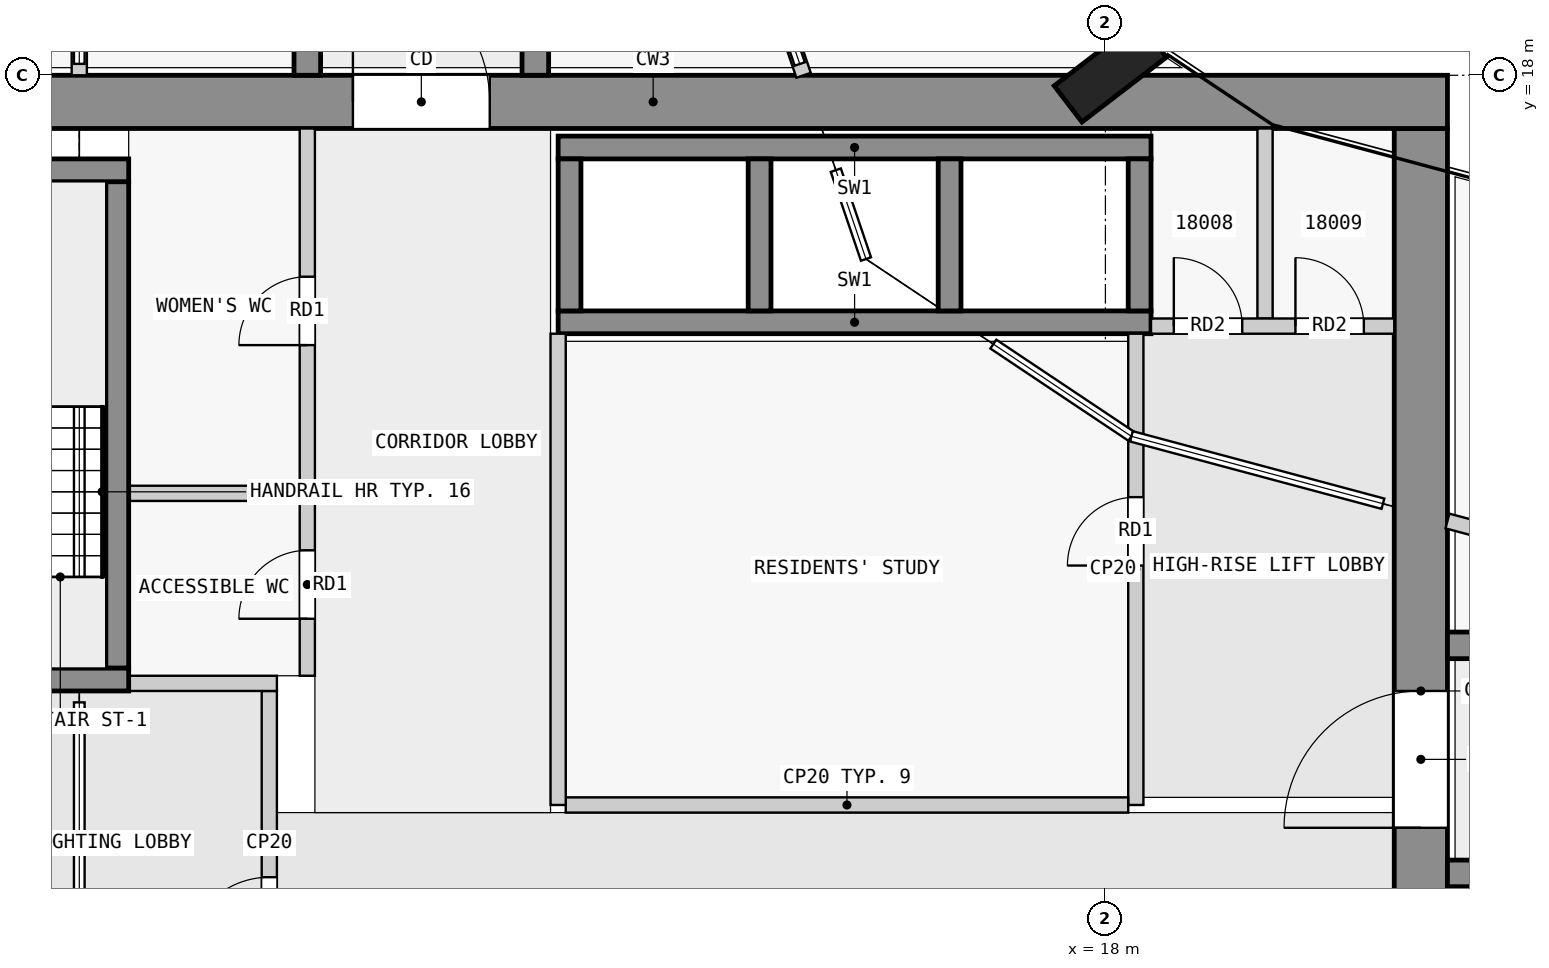
"""IFC4 building model, lengths in metres.
Left out: names, types, materials, properties, quantities, classifications, styles, units other than length and angle.
Written with IfcOpenShell. Run it as: python <this file> out.ifc"""

import sys

from ifc_helpers import new_model, si_unit, direction, frame, frame_2d, origin, origin_2d, place, context, subcontext, project, spatial, rectangle, extrude, element, fill, save


model = new_model("IFC4")
c1 = context("Model", 3, precision=1e-05, world=origin(), true_north=direction((0.0, 1.0)))
c2 = subcontext(c1, "Body", "Model", "MODEL_VIEW")
j1 = project(units=[si_unit("LENGTHUNIT", "METRE"), si_unit("PLANEANGLEUNIT", "RADIAN")], contexts=[c1])
p1 = place(None, origin())
s1 = spatial("IfcSite", under=j1, at=p1, CompositionType="ELEMENT")
p2 = place(p1, origin())
s2 = spatial("IfcBuilding", under=s1, at=p2, CompositionType="ELEMENT")
p3 = place(p2, frame((0.0, 0.0, 72.3)))
s3 = spatial("IfcBuildingStorey", under=s2, at=p3, CompositionType="ELEMENT", Elevation=72.3)
p4 = place(p3, frame((18.065, 18.05, 0.0), z_axis=(0.0, 0.0, 1.0), x_axis=(-0.608810846443, 0.793315418515, 0.0)))
e1 = element("IfcColumn", 1, at=p4, inside=s3, PredefinedType="COLUMN", context=c2, shape_type="SweptSolid", body=[
    extrude(rectangle(XDim=0.6, YDim=1.4, at=origin_2d()), origin(), (0.0, 0.0, 1.0), 6.0),
])
p5 = place(p3, frame((1.6, 17.65, 0.0), z_axis=(0.0, 0.0, 1.0), x_axis=(1.0, 0.0, 0.0)))
e2 = element("IfcWall", 2, at=p5, inside=s3, PredefinedType="SHEAR", context=c2, shape_type="SweptSolid", body=[
    extrude(rectangle(XDim=20.9, YDim=0.7, at=frame_2d((10.45, 0.0))), origin(), (0.0, 0.0, 1.0), 5.75),
])
p6 = place(p5, frame((6.5, 0.0, 0.0)))
e3 = element("IfcOpeningElement", 3, at=p6, cuts=e2, PredefinedType="OPENING", context=c2, shape_type="SweptSolid", body=[
    extrude(rectangle(XDim=1.8, YDim=2.1, at=frame_2d((0.9, 1.05))), frame((0.0, 0.36, 0.0), z_axis=(0.0, -1.0, 0.0), x_axis=(1.0, 0.0, 0.0)), (0.0, 0.0, 1.0), 0.72),
])
p7 = place(p3, frame((22.15, 2.5, 0.0), z_axis=(0.0, 0.0, 1.0), x_axis=(0.0, 1.0, 0.0)))
e4 = element("IfcWall", 4, at=p7, inside=s3, PredefinedType="SHEAR", context=c2, shape_type="SweptSolid", body=[
    extrude(rectangle(XDim=14.8, YDim=0.7, at=frame_2d((7.4, 0.0))), origin(), (0.0, 0.0, 1.0), 5.75),
])
p8 = place(p7, frame((5.6, 0.0, 0.0)))
e5 = element("IfcOpeningElement", 5, at=p8, cuts=e4, PredefinedType="OPENING", context=c2, shape_type="SweptSolid", body=[
    extrude(rectangle(XDim=1.8, YDim=2.1, at=frame_2d((0.9, 1.05))), frame((0.0, 0.36, 0.0), z_axis=(0.0, -1.0, 0.0), x_axis=(1.0, 0.0, 0.0)), (0.0, 0.0, 1.0), 0.72),
])
p9 = place(p3, frame((2.3, 10.05, 0.0), z_axis=(0.0, 0.0, 1.0), x_axis=(1.0, 0.0, 0.0)))
e6 = element("IfcWall", 6, at=p9, inside=s3, PredefinedType="SHEAR", context=c2, shape_type="SweptSolid", body=[
    extrude(rectangle(XDim=2.85, YDim=0.3, at=frame_2d((1.425, 0.0))), origin(), (0.0, 0.0, 1.0), 5.75),
])
p10 = place(p9, frame((0.25, 0.0, 0.0)))
e7 = element("IfcOpeningElement", 7, at=p10, cuts=e6, PredefinedType="OPENING", context=c2, shape_type="SweptSolid", body=[
    extrude(rectangle(XDim=1.1, YDim=2.1, at=frame_2d((0.55, 1.05))), frame((0.0, 0.16, 0.0), z_axis=(0.0, -1.0, 0.0), x_axis=(1.0, 0.0, 0.0)), (0.0, 0.0, 1.0), 0.32),
])
p11 = place(p3, frame((5.0, 10.2, 0.0), z_axis=(0.0, 0.0, 1.0), x_axis=(0.0, 1.0, 0.0)))
e8 = element("IfcWall", 8, at=p11, inside=s3, PredefinedType="SHEAR", context=c2, shape_type="SweptSolid", body=[
    extrude(rectangle(XDim=6.4, YDim=0.3, at=frame_2d((3.2, 0.0))), origin(), (0.0, 0.0, 1.0), 5.75),
])
p12 = place(p3, frame((2.3, 16.75, 0.0), z_axis=(0.0, 0.0, 1.0), x_axis=(1.0, 0.0, 0.0)))
e9 = element("IfcWall", 9, at=p12, inside=s3, PredefinedType="SHEAR", context=c2, shape_type="SweptSolid", body=[
    extrude(rectangle(XDim=2.85, YDim=0.3, at=frame_2d((1.425, 0.0))), origin(), (0.0, 0.0, 1.0), 5.75),
])
for number, where, z_axis, x_axis in (
    (10, (10.8, 17.05, 0.0), (0.0, 0.0, 1.0), (1.0, 0.0, 0.0)),
    (11, (10.8, 14.75, 0.0), (0.0, 0.0, 1.0), (1.0, 0.0, 0.0)),
):
    element("IfcWall", number, at=place(p3, frame(where, z_axis=z_axis, x_axis=x_axis)), inside=s3, PredefinedType="SHEAR", context=c2, shape_type="SweptSolid", body=[
        extrude(rectangle(XDim=7.8, YDim=0.3, at=frame_2d((3.9, 0.0))), origin(), (0.0, 0.0, 1.0), 5.75),
    ])
for number, where, z_axis, x_axis in (
    (12, (10.95, 14.9, 0.0), (0.0, 0.0, 1.0), (0.0, 1.0, 0.0)),
    (13, (13.45, 14.9, 0.0), (0.0, 0.0, 1.0), (0.0, 1.0, 0.0)),
    (14, (15.95, 14.9, 0.0), (0.0, 0.0, 1.0), (0.0, 1.0, 0.0)),
    (15, (18.45, 14.9, 0.0), (0.0, 0.0, 1.0), (0.0, 1.0, 0.0)),
):
    element("IfcWall", number, at=place(p3, frame(where, z_axis=z_axis, x_axis=x_axis)), inside=s3, PredefinedType="SHEAR", context=c2, shape_type="SweptSolid", body=[
        extrude(rectangle(XDim=2.0, YDim=0.3, at=frame_2d((1.0, 0.0))), origin(), (0.0, 0.0, 1.0), 5.75),
    ])
p13 = place(p3, frame((22.5, 7.5, 0.0), z_axis=(0.0, 0.0, 1.0), x_axis=(1.0, 0.0, 0.0)))
e16 = element("IfcWall", 16, at=p13, inside=s3, PredefinedType="SHEAR", context=c2, shape_type="SweptSolid", body=[
    extrude(rectangle(XDim=22.5, YDim=0.35, at=frame_2d((11.25, 0.0))), origin(), (0.0, 0.0, 1.0), 5.75),
])
p14 = place(p13, frame((20.1, 0.0, 0.0)))
e17 = element("IfcOpeningElement", 17, at=p14, cuts=e16, PredefinedType="OPENING", context=c2, shape_type="SweptSolid", body=[
    extrude(rectangle(XDim=1.8, YDim=2.1, at=frame_2d((0.9, 1.05))), frame((0.0, 0.185, 0.0), z_axis=(0.0, -1.0, 0.0), x_axis=(1.0, 0.0, 0.0)), (0.0, 0.0, 1.0), 0.37),
])
p15 = place(p13, frame((15.35, 0.0, 0.0)))
e18 = element("IfcOpeningElement", 18, at=p15, cuts=e16, PredefinedType="OPENING", context=c2, shape_type="SweptSolid", body=[
    extrude(rectangle(XDim=0.9, YDim=2.1, at=frame_2d((0.45, 1.05))), frame((0.0, 0.185, 0.0), z_axis=(0.0, -1.0, 0.0), x_axis=(1.0, 0.0, 0.0)), (0.0, 0.0, 1.0), 0.37),
])
p16 = place(p3, frame((22.5, 10.5, 0.0), z_axis=(0.0, 0.0, 1.0), x_axis=(1.0, 0.0, 0.0)))
e19 = element("IfcWall", 19, at=p16, inside=s3, PredefinedType="SHEAR", context=c2, shape_type="SweptSolid", body=[
    extrude(rectangle(XDim=22.5, YDim=0.35, at=frame_2d((11.25, 0.0))), origin(), (0.0, 0.0, 1.0), 5.75),
])
p17 = place(p16, frame((10.85, 0.0, 0.0)))
e20 = element("IfcOpeningElement", 20, at=p17, cuts=e19, PredefinedType="OPENING", context=c2, shape_type="SweptSolid", body=[
    extrude(rectangle(XDim=0.9, YDim=2.1, at=frame_2d((0.45, 1.05))), frame((0.0, 0.185, 0.0), z_axis=(0.0, -1.0, 0.0), x_axis=(1.0, 0.0, 0.0)), (0.0, 0.0, 1.0), 0.37),
])
p18 = place(p16, frame((15.35, 0.0, 0.0)))
e21 = element("IfcOpeningElement", 21, at=p18, cuts=e19, PredefinedType="OPENING", context=c2, shape_type="SweptSolid", body=[
    extrude(rectangle(XDim=1.0, YDim=2.1, at=frame_2d((0.5, 1.05))), frame((0.0, 0.185, 0.0), z_axis=(0.0, -1.0, 0.0), x_axis=(1.0, 0.0, 0.0)), (0.0, 0.0, 1.0), 0.37),
])
p19 = place(p16, frame((3.6, 0.0, 0.0)))
e22 = element("IfcOpeningElement", 22, at=p19, cuts=e19, PredefinedType="OPENING", context=c2, shape_type="SweptSolid", body=[
    extrude(rectangle(XDim=1.8, YDim=2.1, at=frame_2d((0.9, 1.05))), frame((0.0, 0.185, 0.0), z_axis=(0.0, -1.0, 0.0), x_axis=(1.0, 0.0, 0.0)), (0.0, 0.0, 1.0), 0.37),
])
p20 = place(p3, frame((7.5, 18.0, 0.0), z_axis=(0.0, 0.0, 1.0), x_axis=(0.0, 1.0, 0.0)))
e23 = element("IfcWall", 23, at=p20, inside=s3, PredefinedType="SHEAR", context=c2, shape_type="SweptSolid", body=[
    extrude(rectangle(XDim=27.0, YDim=0.35, at=frame_2d((13.5, 0.0))), origin(), (0.0, 0.0, 1.0), 5.75),
])
p21 = place(p20, frame((24.6, 0.0, 0.0)))
e24 = element("IfcOpeningElement", 24, at=p21, cuts=e23, PredefinedType="OPENING", context=c2, shape_type="SweptSolid", body=[
    extrude(rectangle(XDim=1.8, YDim=2.1, at=frame_2d((0.9, 1.05))), frame((0.0, 0.185, 0.0), z_axis=(0.0, -1.0, 0.0), x_axis=(1.0, 0.0, 0.0)), (0.0, 0.0, 1.0), 0.37),
])
p22 = place(p20, frame((11.6, 0.0, 0.0)))
e25 = element("IfcOpeningElement", 25, at=p22, cuts=e23, PredefinedType="OPENING", context=c2, shape_type="SweptSolid", body=[
    extrude(rectangle(XDim=0.9, YDim=2.1, at=frame_2d((0.45, 1.05))), frame((0.0, 0.185, 0.0), z_axis=(0.0, -1.0, 0.0), x_axis=(1.0, 0.0, 0.0)), (0.0, 0.0, 1.0), 0.37),
])
p23 = place(p20, frame((17.65, 0.0, 0.0)))
e26 = element("IfcOpeningElement", 26, at=p23, cuts=e23, PredefinedType="OPENING", context=c2, shape_type="SweptSolid", body=[
    extrude(rectangle(XDim=0.9, YDim=2.1, at=frame_2d((0.45, 1.05))), frame((0.0, 0.185, 0.0), z_axis=(0.0, -1.0, 0.0), x_axis=(1.0, 0.0, 0.0)), (0.0, 0.0, 1.0), 0.37),
])
p24 = place(p20, frame((21.55, 0.0, 0.0)))
e27 = element("IfcOpeningElement", 27, at=p24, cuts=e23, PredefinedType="OPENING", context=c2, shape_type="SweptSolid", body=[
    extrude(rectangle(XDim=1.0, YDim=2.1, at=frame_2d((0.5, 1.05))), frame((0.0, 0.185, 0.0), z_axis=(0.0, -1.0, 0.0), x_axis=(1.0, 0.0, 0.0)), (0.0, 0.0, 1.0), 0.37),
])
p25 = place(p20, frame((3.6, 0.0, 0.0)))
e28 = element("IfcOpeningElement", 28, at=p25, cuts=e23, PredefinedType="OPENING", context=c2, shape_type="SweptSolid", body=[
    extrude(rectangle(XDim=1.8, YDim=2.1, at=frame_2d((0.9, 1.05))), frame((0.0, 0.185, 0.0), z_axis=(0.0, -1.0, 0.0), x_axis=(1.0, 0.0, 0.0)), (0.0, 0.0, 1.0), 0.37),
])
p26 = place(p3, frame((10.5, 18.0, 0.0), z_axis=(0.0, 0.0, 1.0), x_axis=(0.0, 1.0, 0.0)))
e29 = element("IfcWall", 29, at=p26, inside=s3, PredefinedType="SHEAR", context=c2, shape_type="SweptSolid", body=[
    extrude(rectangle(XDim=27.0, YDim=0.35, at=frame_2d((13.5, 0.0))), origin(), (0.0, 0.0, 1.0), 5.75),
])
p27 = place(p26, frame((10.45, 0.0, 0.0)))
e30 = element("IfcOpeningElement", 30, at=p27, cuts=e29, PredefinedType="OPENING", context=c2, shape_type="SweptSolid", body=[
    extrude(rectangle(XDim=0.9, YDim=2.1, at=frame_2d((0.45, 1.05))), frame((0.0, 0.185, 0.0), z_axis=(0.0, -1.0, 0.0), x_axis=(1.0, 0.0, 0.0)), (0.0, 0.0, 1.0), 0.37),
])
p28 = place(p26, frame((15.85, 0.0, 0.0)))
e31 = element("IfcOpeningElement", 31, at=p28, cuts=e29, PredefinedType="OPENING", context=c2, shape_type="SweptSolid", body=[
    extrude(rectangle(XDim=0.9, YDim=2.1, at=frame_2d((0.45, 1.05))), frame((0.0, 0.185, 0.0), z_axis=(0.0, -1.0, 0.0), x_axis=(1.0, 0.0, 0.0)), (0.0, 0.0, 1.0), 0.37),
])
p29 = place(p26, frame((20.25, 0.0, 0.0)))
e32 = element("IfcOpeningElement", 32, at=p29, cuts=e29, PredefinedType="OPENING", context=c2, shape_type="SweptSolid", body=[
    extrude(rectangle(XDim=1.0, YDim=2.1, at=frame_2d((0.5, 1.05))), frame((0.0, 0.185, 0.0), z_axis=(0.0, -1.0, 0.0), x_axis=(1.0, 0.0, 0.0)), (0.0, 0.0, 1.0), 0.37),
])
p30 = place(p26, frame((24.35, 0.0, 0.0)))
e33 = element("IfcOpeningElement", 33, at=p30, cuts=e29, PredefinedType="OPENING", context=c2, shape_type="SweptSolid", body=[
    extrude(rectangle(XDim=0.9, YDim=2.1, at=frame_2d((0.45, 1.05))), frame((0.0, 0.185, 0.0), z_axis=(0.0, -1.0, 0.0), x_axis=(1.0, 0.0, 0.0)), (0.0, 0.0, 1.0), 0.37),
])
p31 = place(p3, frame((7.0, 5.9, 0.0), z_axis=(0.0, 0.0, 1.0), x_axis=(0.0, 1.0, 0.0)))
e34 = element("IfcWall", 34, at=p31, inside=s3, PredefinedType="PARTITIONING", context=c2, shape_type="SweptSolid", body=[
    extrude(rectangle(XDim=4.0, YDim=0.2, at=frame_2d((2.0, 0.0))), origin(), (0.0, 0.0, 1.0), 5.75),
])
p32 = place(p31, frame((0.45, 0.0, 0.0)))
e35 = element("IfcOpeningElement", 35, at=p32, cuts=e34, PredefinedType="OPENING", context=c2, shape_type="SweptSolid", body=[
    extrude(rectangle(XDim=1.1, YDim=2.1, at=frame_2d((0.55, 1.05))), frame((0.0, 0.11, 0.0), z_axis=(0.0, -1.0, 0.0), x_axis=(1.0, 0.0, 0.0)), (0.0, 0.0, 1.0), 0.22),
])
p33 = place(p3, frame((5.15, 10.0, 0.0), z_axis=(0.0, 0.0, 1.0), x_axis=(1.0, 0.0, 0.0)))
e36 = element("IfcWall", 36, at=p33, inside=s3, PredefinedType="PARTITIONING", context=c2, shape_type="SweptSolid", body=[
    extrude(rectangle(XDim=1.95, YDim=0.2, at=frame_2d((0.975, 0.0))), origin(), (0.0, 0.0, 1.0), 5.75),
])
p34 = place(p3, frame((10.8, 8.4, 0.0), z_axis=(0.0, 0.0, 1.0), x_axis=(0.0, 1.0, 0.0)))
e37 = element("IfcWall", 37, at=p34, inside=s3, PredefinedType="PARTITIONING", context=c2, shape_type="SweptSolid", body=[
    extrude(rectangle(XDim=6.2, YDim=0.2, at=frame_2d((3.1, 0.0))), origin(), (0.0, 0.0, 1.0), 5.75),
])
p35 = place(p3, frame((10.9, 8.4, 0.0), z_axis=(0.0, 0.0, 1.0), x_axis=(1.0, 0.0, 0.0)))
e38 = element("IfcWall", 38, at=p35, inside=s3, PredefinedType="PARTITIONING", context=c2, shape_type="SweptSolid", body=[
    extrude(rectangle(XDim=7.4, YDim=0.2, at=frame_2d((3.7, 0.0))), origin(), (0.0, 0.0, 1.0), 5.75),
])
p36 = place(p3, frame((18.4, 8.4, 0.0), z_axis=(0.0, 0.0, 1.0), x_axis=(0.0, 1.0, 0.0)))
e39 = element("IfcWall", 39, at=p36, inside=s3, PredefinedType="PARTITIONING", context=c2, shape_type="SweptSolid", body=[
    extrude(rectangle(XDim=6.2, YDim=0.2, at=frame_2d((3.1, 0.0))), origin(), (0.0, 0.0, 1.0), 5.75),
])
p37 = place(p36, frame((3.15, 0.0, 0.0)))
e40 = element("IfcOpeningElement", 40, at=p37, cuts=e39, PredefinedType="OPENING", context=c2, shape_type="SweptSolid", body=[
    extrude(rectangle(XDim=0.9, YDim=2.1, at=frame_2d((0.45, 1.05))), frame((0.0, 0.11, 0.0), z_axis=(0.0, -1.0, 0.0), x_axis=(1.0, 0.0, 0.0)), (0.0, 0.0, 1.0), 0.22),
])
p38 = place(p3, frame((7.5, 10.1, 0.0), z_axis=(0.0, 0.0, 1.0), x_axis=(0.0, 1.0, 0.0)))
e41 = element("IfcWall", 41, at=p38, inside=s3, PredefinedType="PARTITIONING", context=c2, shape_type="SweptSolid", body=[
    extrude(rectangle(XDim=7.2, YDim=0.2, at=frame_2d((3.6, 0.0))), origin(), (0.0, 0.0, 1.0), 5.75),
])
p39 = place(p38, frame((0.75, 0.0, 0.0)))
e42 = element("IfcOpeningElement", 42, at=p39, cuts=e41, PredefinedType="OPENING", context=c2, shape_type="SweptSolid", body=[
    extrude(rectangle(XDim=0.9, YDim=2.1, at=frame_2d((0.45, 1.05))), frame((0.0, 0.11, 0.0), z_axis=(0.0, -1.0, 0.0), x_axis=(1.0, 0.0, 0.0)), (0.0, 0.0, 1.0), 0.22),
])
p40 = place(p38, frame((4.35, 0.0, 0.0)))
e43 = element("IfcOpeningElement", 43, at=p40, cuts=e41, PredefinedType="OPENING", context=c2, shape_type="SweptSolid", body=[
    extrude(rectangle(XDim=0.9, YDim=2.1, at=frame_2d((0.45, 1.05))), frame((0.0, 0.11, 0.0), z_axis=(0.0, -1.0, 0.0), x_axis=(1.0, 0.0, 0.0)), (0.0, 0.0, 1.0), 0.22),
])
p41 = place(p3, frame((5.15, 12.5, 0.0), z_axis=(0.0, 0.0, 1.0), x_axis=(1.0, 0.0, 0.0)))
e44 = element("IfcWall", 44, at=p41, inside=s3, PredefinedType="PARTITIONING", context=c2, shape_type="SweptSolid", body=[
    extrude(rectangle(XDim=2.25, YDim=0.2, at=frame_2d((1.125, 0.0))), origin(), (0.0, 0.0, 1.0), 5.75),
])
p42 = place(p3, frame((18.6, 14.7, 0.0), z_axis=(0.0, 0.0, 1.0), x_axis=(1.0, 0.0, 0.0)))
e45 = element("IfcWall", 45, at=p42, inside=s3, PredefinedType="PARTITIONING", context=c2, shape_type="SweptSolid", body=[
    extrude(rectangle(XDim=3.2, YDim=0.2, at=frame_2d((1.6, 0.0))), origin(), (0.0, 0.0, 1.0), 5.75),
])
p43 = place(p42, frame((0.3, 0.0, 0.0)))
e46 = element("IfcOpeningElement", 46, at=p43, cuts=e45, PredefinedType="OPENING", context=c2, shape_type="SweptSolid", body=[
    extrude(rectangle(XDim=0.9, YDim=2.1, at=frame_2d((0.45, 1.05))), frame((0.0, 0.11, 0.0), z_axis=(0.0, -1.0, 0.0), x_axis=(1.0, 0.0, 0.0)), (0.0, 0.0, 1.0), 0.22),
])
p44 = place(p42, frame((1.9, 0.0, 0.0)))
e47 = element("IfcOpeningElement", 47, at=p44, cuts=e45, PredefinedType="OPENING", context=c2, shape_type="SweptSolid", body=[
    extrude(rectangle(XDim=0.9, YDim=2.1, at=frame_2d((0.45, 1.05))), frame((0.0, 0.11, 0.0), z_axis=(0.0, -1.0, 0.0), x_axis=(1.0, 0.0, 0.0)), (0.0, 0.0, 1.0), 0.22),
])
p45 = place(p3, frame((20.1, 14.8, 0.0), z_axis=(0.0, 0.0, 1.0), x_axis=(0.0, 1.0, 0.0)))
e48 = element("IfcWall", 48, at=p45, inside=s3, PredefinedType="PARTITIONING", context=c2, shape_type="SweptSolid", body=[
    extrude(rectangle(XDim=2.5, YDim=0.2, at=frame_2d((1.25, 0.0))), origin(), (0.0, 0.0, 1.0), 5.75),
])
p46 = place(p3, frame((22.5, 12.136, 0.0), z_axis=(0.0, 0.0, 1.0), x_axis=(0.96602336302, -0.258454758323, 0.0)))
e49 = element("IfcWall", 49, at=p46, inside=s3, PredefinedType="PARTITIONING", context=c2, shape_type="SweptSolid", body=[
    extrude(rectangle(XDim=0.94, YDim=0.2, at=frame_2d((0.47, 0.0))), origin(), (0.0, 0.0, 1.0), 5.75),
])
p47 = place(p3, frame((4.5, 27.0, 0.0), z_axis=(0.0, 0.0, 1.0), x_axis=(0.0, -1.0, 0.0)))
e50 = element("IfcWall", 50, at=p47, inside=s3, PredefinedType="PARTITIONING", context=c2, shape_type="SweptSolid", body=[
    extrude(rectangle(XDim=9.0, YDim=0.2, at=frame_2d((4.5, 0.0))), origin(), (0.0, 0.0, 1.0), 5.75),
])
p48 = place(p3, frame((14.029, 18.0, 0.0), z_axis=(0.0, 0.0, 1.0), x_axis=(-0.32133908787, 0.946964197109, 0.0)))
e51 = element("IfcWall", 51, at=p48, inside=s3, PredefinedType="PARTITIONING", context=c2, shape_type="SweptSolid", body=[
    extrude(rectangle(XDim=1.646, YDim=0.2, at=frame_2d((0.823, 0.0))), origin(), (0.0, 0.0, 1.0), 5.75),
])
p49 = place(p32, origin())
e52 = element("IfcDoor", 52, at=p49, inside=s3, OperationType="SINGLE_SWING_LEFT", PredefinedType="DOOR", context=c2, shape_type="SweptSolid", body=[
    extrude(rectangle(XDim=1.1, YDim=2.1, at=frame_2d((0.55, 1.05))), frame((0.0, 0.025, 0.0), z_axis=(0.0, -1.0, 0.0), x_axis=(1.0, 0.0, 0.0)), (0.0, 0.0, 1.0), 0.05),
])
fill(e35, e52)
p50 = place(p37, origin())
e53 = element("IfcDoor", 53, at=p50, inside=s3, OperationType="SINGLE_SWING_LEFT", PredefinedType="DOOR", context=c2, shape_type="SweptSolid", body=[
    extrude(rectangle(XDim=0.9, YDim=2.1, at=frame_2d((0.45, 1.05))), frame((0.0, 0.025, 0.0), z_axis=(0.0, -1.0, 0.0), x_axis=(1.0, 0.0, 0.0)), (0.0, 0.0, 1.0), 0.05),
])
fill(e40, e53)
p51 = place(p8, origin())
e54 = element("IfcDoor", 54, at=p51, inside=s3, OperationType="DOUBLE_DOOR_SINGLE_SWING", PredefinedType="DOOR", context=c2, shape_type="SweptSolid", body=[
    extrude(rectangle(XDim=1.8, YDim=2.1, at=frame_2d((0.9, 1.05))), frame((0.0, 0.025, 0.0), z_axis=(0.0, -1.0, 0.0), x_axis=(1.0, 0.0, 0.0)), (0.0, 0.0, 1.0), 0.05),
])
fill(e5, e54)
p52 = place(p6, origin())
e55 = element("IfcDoor", 55, at=p52, inside=s3, OperationType="DOUBLE_DOOR_SINGLE_SWING", PredefinedType="DOOR", context=c2, shape_type="SweptSolid", body=[
    extrude(rectangle(XDim=1.8, YDim=2.1, at=frame_2d((0.9, 1.05))), frame((0.0, 0.025, 0.0), z_axis=(0.0, -1.0, 0.0), x_axis=(1.0, 0.0, 0.0)), (0.0, 0.0, 1.0), 0.05),
])
fill(e3, e55)
p53 = place(p39, origin())
e56 = element("IfcDoor", 56, at=p53, inside=s3, OperationType="SINGLE_SWING_RIGHT", PredefinedType="DOOR", context=c2, shape_type="SweptSolid", body=[
    extrude(rectangle(XDim=0.9, YDim=2.1, at=frame_2d((0.45, 1.05))), frame((0.0, 0.025, 0.0), z_axis=(0.0, -1.0, 0.0), x_axis=(1.0, 0.0, 0.0)), (0.0, 0.0, 1.0), 0.05),
])
fill(e42, e56)
p54 = place(p40, origin())
e57 = element("IfcDoor", 57, at=p54, inside=s3, OperationType="SINGLE_SWING_RIGHT", PredefinedType="DOOR", context=c2, shape_type="SweptSolid", body=[
    extrude(rectangle(XDim=0.9, YDim=2.1, at=frame_2d((0.45, 1.05))), frame((0.0, 0.025, 0.0), z_axis=(0.0, -1.0, 0.0), x_axis=(1.0, 0.0, 0.0)), (0.0, 0.0, 1.0), 0.05),
])
fill(e43, e57)
p55 = place(p43, origin())
e58 = element("IfcDoor", 58, at=p55, inside=s3, OperationType="SINGLE_SWING_LEFT", PredefinedType="DOOR", context=c2, shape_type="SweptSolid", body=[
    extrude(rectangle(XDim=0.9, YDim=2.1, at=frame_2d((0.45, 1.05))), frame((0.0, 0.025, 0.0), z_axis=(0.0, -1.0, 0.0), x_axis=(1.0, 0.0, 0.0)), (0.0, 0.0, 1.0), 0.05),
])
fill(e46, e58)
p56 = place(p44, origin())
e59 = element("IfcDoor", 59, at=p56, inside=s3, OperationType="SINGLE_SWING_LEFT", PredefinedType="DOOR", context=c2, shape_type="SweptSolid", body=[
    extrude(rectangle(XDim=0.9, YDim=2.1, at=frame_2d((0.45, 1.05))), frame((0.0, 0.025, 0.0), z_axis=(0.0, -1.0, 0.0), x_axis=(1.0, 0.0, 0.0)), (0.0, 0.0, 1.0), 0.05),
])
fill(e47, e59)
save(model, sys.argv[1])
